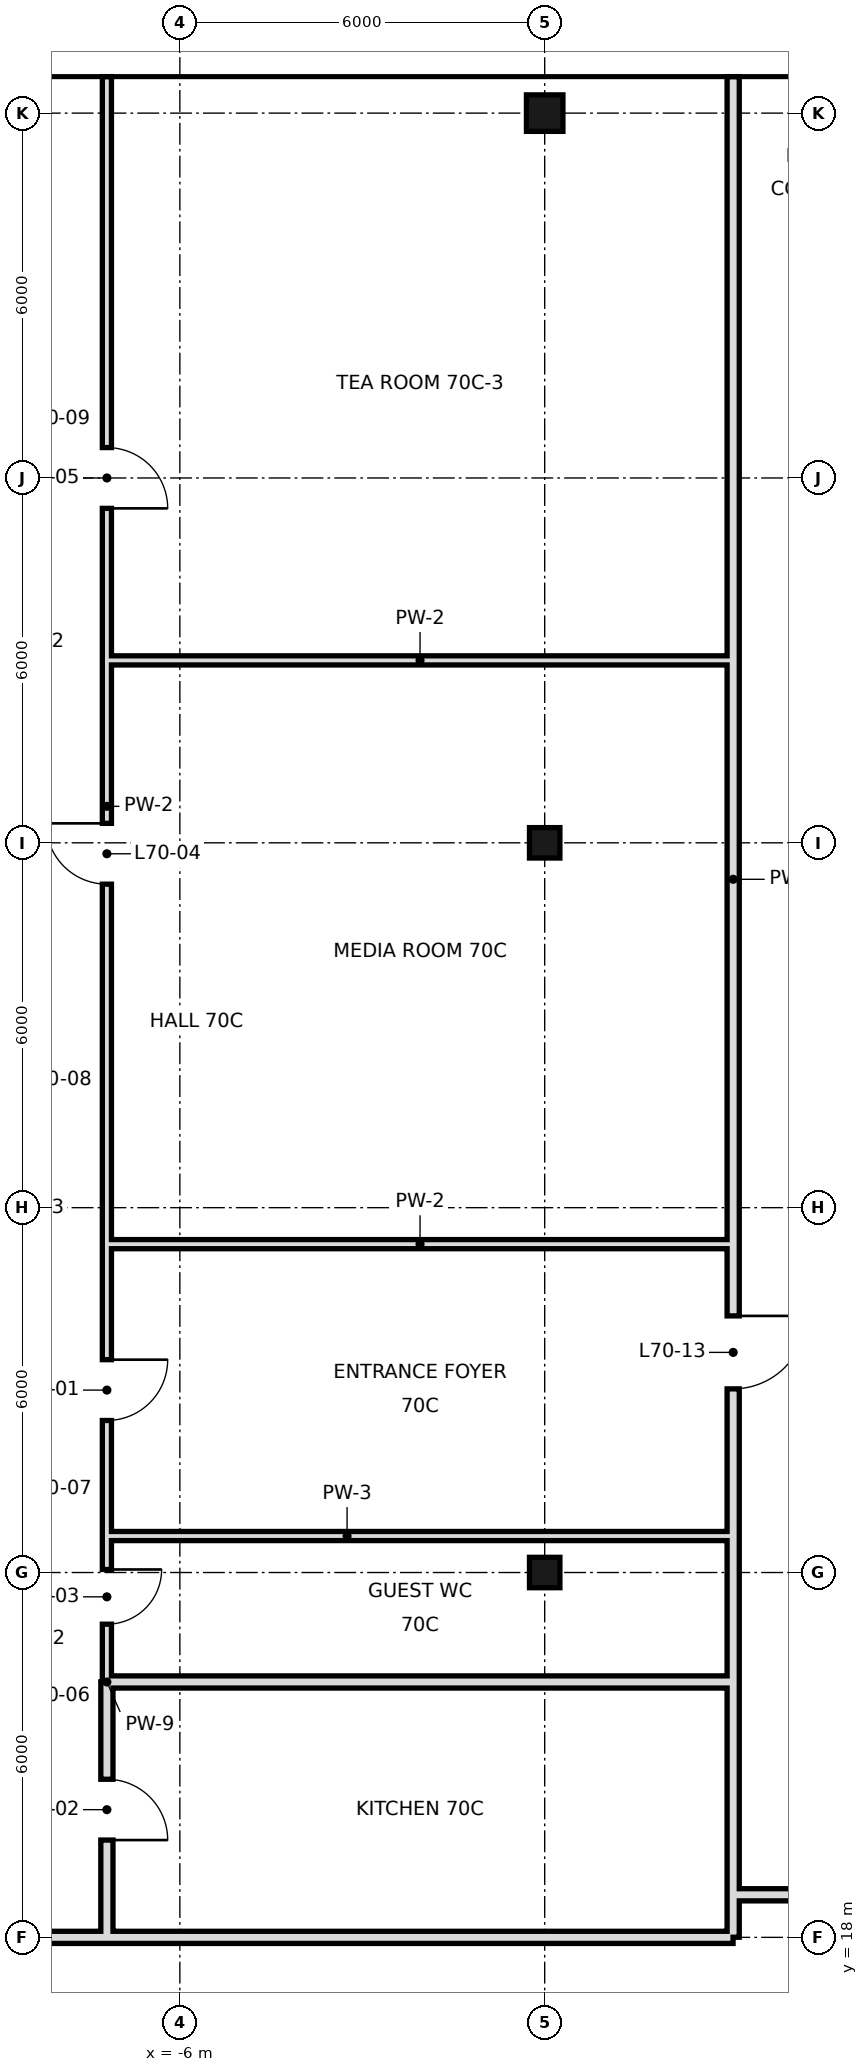
"""IFC4 building model, lengths in metres.
Left out: names, types, materials, properties, quantities, classifications, styles, units other than length and angle.
Written with IfcOpenShell. Run it as: python <this file> out.ifc"""

import sys

from ifc_helpers import new_model, si_unit, direction, frame, frame_2d, origin, origin_2d, place, context, subcontext, project, spatial, rectangle, hollow_rectangle, extrude, element, fill, save


model = new_model("IFC4")
c1 = context("Model", 3, precision=1e-05, world=origin(), true_north=direction((0.0, 1.0)))
c2 = subcontext(c1, "Body", "Model", "MODEL_VIEW")
j1 = project(units=[si_unit("LENGTHUNIT", "METRE"), si_unit("PLANEANGLEUNIT", "RADIAN")], contexts=[c1])
p1 = place(None, origin())
s1 = spatial("IfcSite", under=j1, at=p1, CompositionType="ELEMENT")
p2 = place(p1, origin())
s2 = spatial("IfcBuilding", under=s1, at=p2, CompositionType="ELEMENT")
p3 = place(p2, frame((0.0, 0.0, 298.0)))
s3 = spatial("IfcBuildingStorey", under=s2, at=p3, CompositionType="ELEMENT", Elevation=298.0)
for number, where, z_axis, x_axis in (
    (1, (0.0, 24.0, 0.0), (0.0, 0.0, 1.0), (1.0, 0.0, 0.0)),
    (2, (0.0, 36.0, 0.0), (0.0, 0.0, 1.0), (1.0, 0.0, 0.0)),
):
    element("IfcColumn", number, at=place(p3, frame(where, z_axis=z_axis, x_axis=x_axis)), inside=s3, PredefinedType="COLUMN", context=c2, shape_type="SweptSolid", body=[
        extrude(hollow_rectangle(XDim=0.5, YDim=0.5, WallThickness=0.025, at=origin_2d()), origin(), (0.0, 0.0, 1.0), 3.6),
    ])
p4 = place(p3, frame((0.0, 48.0, 0.0), z_axis=(0.0, 0.0, 1.0), x_axis=(1.0, 0.0, 0.0)))
e3 = element("IfcColumn", 3, at=p4, inside=s3, PredefinedType="COLUMN", context=c2, shape_type="SweptSolid", body=[
    extrude(hollow_rectangle(XDim=0.6, YDim=0.6, WallThickness=0.028, at=origin_2d()), origin(), (0.0, 0.0, 1.0), 3.6),
])
p5 = place(p3, frame((-7.2, 18.0, 0.0), z_axis=(0.0, 0.0, 1.0), x_axis=(0.0, 1.0, 0.0)))
e4 = element("IfcWall", 4, at=p5, inside=s3, PredefinedType="SOLIDWALL", context=c2, shape_type="SweptSolid", body=[
    extrude(rectangle(XDim=4.2, YDim=0.2, at=frame_2d((2.1, 0.0))), origin(), (0.0, 0.0, 1.0), 2.72),
])
p6 = place(p5, frame((1.6, 0.0, 0.0)))
e5 = element("IfcOpeningElement", 5, at=p6, cuts=e4, PredefinedType="OPENING", context=c2, shape_type="SweptSolid", body=[
    extrude(rectangle(XDim=1.0, YDim=2.4, at=frame_2d((0.5, 1.2))), frame((0.0, 0.11, 0.0), z_axis=(0.0, -1.0, 0.0), x_axis=(1.0, 0.0, 0.0)), (0.0, 0.0, 1.0), 0.22),
])
p7 = place(p3, frame((-7.2, 24.6, 0.0), z_axis=(0.0, 0.0, 1.0), x_axis=(0.0, 1.0, 0.0)))
e6 = element("IfcWall", 6, at=p7, inside=s3, PredefinedType="PARTITIONING", context=c2, shape_type="SweptSolid", body=[
    extrude(rectangle(XDim=24.0, YDim=0.15, at=frame_2d((12.0, 0.0))), origin(), (0.0, 0.0, 1.0), 3.42),
])
p8 = place(p7, frame((1.9, 0.0, 0.0)))
e7 = element("IfcOpeningElement", 7, at=p8, cuts=e6, PredefinedType="OPENING", context=c2, shape_type="SweptSolid", body=[
    extrude(rectangle(XDim=1.0, YDim=2.4, at=frame_2d((0.5, 1.2))), frame((0.0, 0.085, 0.0), z_axis=(0.0, -1.0, 0.0), x_axis=(1.0, 0.0, 0.0)), (0.0, 0.0, 1.0), 0.17),
])
p9 = place(p7, frame((10.72, 0.0, 0.0)))
e8 = element("IfcOpeningElement", 8, at=p9, cuts=e6, PredefinedType="OPENING", context=c2, shape_type="SweptSolid", body=[
    extrude(rectangle(XDim=1.0, YDim=2.4, at=frame_2d((0.5, 1.2))), frame((0.0, 0.085, 0.0), z_axis=(0.0, -1.0, 0.0), x_axis=(1.0, 0.0, 0.0)), (0.0, 0.0, 1.0), 0.17),
])
p10 = place(p7, frame((16.9, 0.0, 0.0)))
e9 = element("IfcOpeningElement", 9, at=p10, cuts=e6, PredefinedType="OPENING", context=c2, shape_type="SweptSolid", body=[
    extrude(rectangle(XDim=1.0, YDim=2.4, at=frame_2d((0.5, 1.2))), frame((0.0, 0.085, 0.0), z_axis=(0.0, -1.0, 0.0), x_axis=(1.0, 0.0, 0.0)), (0.0, 0.0, 1.0), 0.17),
])
p11 = place(p3, frame((-7.2, 22.2, 0.0), z_axis=(0.0, 0.0, 1.0), x_axis=(0.0, 1.0, 0.0)))
e10 = element("IfcWall", 10, at=p11, inside=s3, PredefinedType="PARTITIONING", context=c2, shape_type="SweptSolid", body=[
    extrude(rectangle(XDim=2.4, YDim=0.15, at=frame_2d((1.2, 0.0))), origin(), (0.0, 0.0, 1.0), 3.42),
])
p12 = place(p11, frame((0.95, 0.0, 0.0)))
e11 = element("IfcOpeningElement", 11, at=p12, cuts=e10, PredefinedType="OPENING", context=c2, shape_type="SweptSolid", body=[
    extrude(rectangle(XDim=0.9, YDim=2.4, at=frame_2d((0.45, 1.2))), frame((0.0, 0.085, 0.0), z_axis=(0.0, -1.0, 0.0), x_axis=(1.0, 0.0, 0.0)), (0.0, 0.0, 1.0), 0.17),
])
p13 = place(p3, frame((3.1, 22.2, 0.0), z_axis=(0.0, 0.0, 1.0), x_axis=(0.0, 1.0, 0.0)))
e12 = element("IfcWall", 12, at=p13, inside=s3, PredefinedType="SOLIDWALL", context=c2, shape_type="SweptSolid", body=[
    extrude(rectangle(XDim=26.4, YDim=0.2, at=frame_2d((13.2, 0.0))), origin(), (0.0, 0.0, 1.0), 2.72),
])
p14 = place(p13, frame((4.82, 0.0, 0.0)))
e13 = element("IfcOpeningElement", 13, at=p14, cuts=e12, PredefinedType="OPENING", context=c2, shape_type="SweptSolid", body=[
    extrude(rectangle(XDim=1.2, YDim=2.4, at=frame_2d((0.6, 1.2))), frame((0.0, 0.11, 0.0), z_axis=(0.0, -1.0, 0.0), x_axis=(1.0, 0.0, 0.0)), (0.0, 0.0, 1.0), 0.22),
])
p15 = place(p3, frame((3.1, 18.002, 0.0), z_axis=(0.0, 0.0, 1.0), x_axis=(0.0, 1.0, 0.0)))
e14 = element("IfcWall", 14, at=p15, inside=s3, PredefinedType="SOLIDWALL", context=c2, shape_type="SweptSolid", body=[
    extrude(rectangle(XDim=4.198, YDim=0.2, at=frame_2d((2.099, 0.0))), origin(), (0.0, 0.0, 1.0), 3.42),
])
p16 = place(p3, frame((-18.6, 18.0, 0.0), z_axis=(0.0, 0.0, 1.0), x_axis=(1.0, 0.0, 0.0)))
e15 = element("IfcWall", 15, at=p16, inside=s3, PredefinedType="SOLIDWALL", context=c2, shape_type="SweptSolid", body=[
    extrude(rectangle(XDim=11.4, YDim=0.2, at=frame_2d((5.7, 0.0))), origin(), (0.0, 0.0, 1.0), 2.72),
])
p17 = place(p3, frame((-7.2, 18.0, 0.0), z_axis=(0.0, 0.0, 1.0), x_axis=(1.0, 0.0, 0.0)))
e16 = element("IfcWall", 16, at=p17, inside=s3, PredefinedType="SOLIDWALL", context=c2, shape_type="SweptSolid", body=[
    extrude(rectangle(XDim=10.298, YDim=0.2, at=frame_2d((5.149, 0.0))), origin(), (0.0, 0.0, 1.0), 2.72),
])
p18 = place(p3, frame((3.1, 18.7, 0.0), z_axis=(0.0, 0.0, 1.0), x_axis=(1.0, 0.0, 0.0)))
e17 = element("IfcWall", 17, at=p18, inside=s3, PredefinedType="SOLIDWALL", context=c2, shape_type="SweptSolid", body=[
    extrude(rectangle(XDim=41.8, YDim=0.2, at=frame_2d((20.9, 0.0))), origin(), (0.0, 0.0, 1.0), 2.72),
])
p19 = place(p18, frame((6.55, 0.0, 0.0)))
e18 = element("IfcOpeningElement", 18, at=p19, cuts=e17, PredefinedType="OPENING", context=c2, shape_type="SweptSolid", body=[
    extrude(rectangle(XDim=1.8, YDim=2.4, at=frame_2d((0.9, 1.2))), frame((0.0, 0.11, 0.0), z_axis=(0.0, -1.0, 0.0), x_axis=(1.0, 0.0, 0.0)), (0.0, 0.0, 1.0), 0.22),
])
p20 = place(p18, frame((22.53, 0.0, 0.0)))
e19 = element("IfcOpeningElement", 19, at=p20, cuts=e17, PredefinedType="OPENING", context=c2, shape_type="SweptSolid", body=[
    extrude(rectangle(XDim=1.8, YDim=2.4, at=frame_2d((0.9, 1.2))), frame((0.0, 0.11, 0.0), z_axis=(0.0, -1.0, 0.0), x_axis=(1.0, 0.0, 0.0)), (0.0, 0.0, 1.0), 0.22),
])
p21 = place(p3, frame((-7.2, 22.2, 0.0), z_axis=(0.0, 0.0, 1.0), x_axis=(1.0, 0.0, 0.0)))
e20 = element("IfcWall", 20, at=p21, inside=s3, PredefinedType="SOLIDWALL", context=c2, shape_type="SweptSolid", body=[
    extrude(rectangle(XDim=10.3, YDim=0.2, at=frame_2d((5.15, 0.0))), origin(), (0.0, 0.0, 1.0), 2.72),
])
for number, where, z_axis, x_axis in (
    (21, (-7.2, 24.6, 0.0), (0.0, 0.0, 1.0), (1.0, 0.0, 0.0)),
    (22, (-7.2, 29.4, 0.0), (0.0, 0.0, 1.0), (1.0, 0.0, 0.0)),
    (23, (-7.2, 39.0, 0.0), (0.0, 0.0, 1.0), (1.0, 0.0, 0.0)),
):
    element("IfcWall", number, at=place(p3, frame(where, z_axis=z_axis, x_axis=x_axis)), inside=s3, PredefinedType="PARTITIONING", context=c2, shape_type="SweptSolid", body=[
        extrude(rectangle(XDim=10.3, YDim=0.15, at=frame_2d((5.15, 0.0))), origin(), (0.0, 0.0, 1.0), 3.42),
    ])
p22 = place(p8, origin())
e24 = element("IfcDoor", 24, at=p22, inside=s3, OperationType="SINGLE_SWING_RIGHT", PredefinedType="DOOR", context=c2, shape_type="SweptSolid", body=[
    extrude(rectangle(XDim=1.0, YDim=2.4, at=frame_2d((0.5, 1.2))), frame((0.0, 0.025, 0.0), z_axis=(0.0, -1.0, 0.0), x_axis=(1.0, 0.0, 0.0)), (0.0, 0.0, 1.0), 0.05),
])
fill(e7, e24)
p23 = place(p6, frame((1.0, 0.0, 0.0), z_axis=(0.0, 0.0, 1.0), x_axis=(-1.0, 0.0, 0.0)))
e25 = element("IfcDoor", 25, at=p23, inside=s3, OperationType="SINGLE_SWING_RIGHT", PredefinedType="DOOR", context=c2, shape_type="SweptSolid", body=[
    extrude(rectangle(XDim=1.0, YDim=2.4, at=frame_2d((0.5, 1.2))), frame((0.0, 0.025, 0.0), z_axis=(0.0, -1.0, 0.0), x_axis=(1.0, 0.0, 0.0)), (0.0, 0.0, 1.0), 0.05),
])
fill(e5, e25)
p24 = place(p12, origin())
e26 = element("IfcDoor", 26, at=p24, inside=s3, OperationType="SINGLE_SWING_RIGHT", PredefinedType="DOOR", context=c2, shape_type="SweptSolid", body=[
    extrude(rectangle(XDim=0.9, YDim=2.4, at=frame_2d((0.45, 1.2))), frame((0.0, 0.025, 0.0), z_axis=(0.0, -1.0, 0.0), x_axis=(1.0, 0.0, 0.0)), (0.0, 0.0, 1.0), 0.05),
])
fill(e11, e26)
p25 = place(p9, frame((1.0, 0.0, 0.0), z_axis=(0.0, 0.0, 1.0), x_axis=(-1.0, 0.0, 0.0)))
e27 = element("IfcDoor", 27, at=p25, inside=s3, OperationType="SINGLE_SWING_LEFT", PredefinedType="DOOR", context=c2, shape_type="SweptSolid", body=[
    extrude(rectangle(XDim=1.0, YDim=2.4, at=frame_2d((0.5, 1.2))), frame((0.0, 0.025, 0.0), z_axis=(0.0, -1.0, 0.0), x_axis=(1.0, 0.0, 0.0)), (0.0, 0.0, 1.0), 0.05),
])
fill(e8, e27)
p26 = place(p10, frame((1.0, 0.0, 0.0), z_axis=(0.0, 0.0, 1.0), x_axis=(-1.0, 0.0, 0.0)))
e28 = element("IfcDoor", 28, at=p26, inside=s3, OperationType="SINGLE_SWING_RIGHT", PredefinedType="DOOR", context=c2, shape_type="SweptSolid", body=[
    extrude(rectangle(XDim=1.0, YDim=2.4, at=frame_2d((0.5, 1.2))), frame((0.0, 0.025, 0.0), z_axis=(0.0, -1.0, 0.0), x_axis=(1.0, 0.0, 0.0)), (0.0, 0.0, 1.0), 0.05),
])
fill(e9, e28)
p27 = place(p14, origin())
e29 = element("IfcDoor", 29, at=p27, inside=s3, OperationType="SINGLE_SWING_RIGHT", PredefinedType="DOOR", context=c2, shape_type="SweptSolid", body=[
    extrude(rectangle(XDim=1.2, YDim=2.4, at=frame_2d((0.6, 1.2))), frame((0.0, 0.025, 0.0), z_axis=(0.0, -1.0, 0.0), x_axis=(1.0, 0.0, 0.0)), (0.0, 0.0, 1.0), 0.05),
])
fill(e13, e29)
save(model, sys.argv[1])
